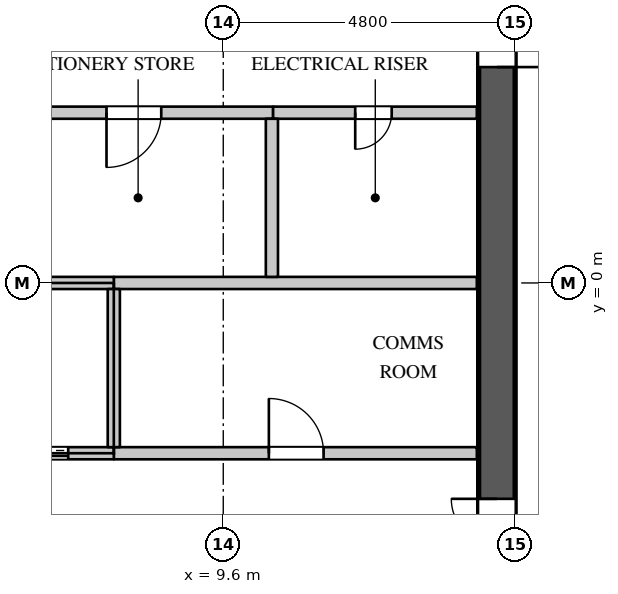
"""IFC4 building model, lengths in metres.
Left out: names, types, materials, properties, quantities, classifications, styles, units other than length and angle.
Written with IfcOpenShell. Run it as: python <this file> out.ifc"""

import sys

from ifc_helpers import new_model, si_unit, direction, frame, frame_2d, origin, place, context, subcontext, project, spatial, rectangle, extrude, element, fill, save


model = new_model("IFC4")
c1 = context("Model", 3, precision=1e-05, world=origin(), true_north=direction((0.0, 1.0)))
c2 = subcontext(c1, "Body", "Model", "MODEL_VIEW")
j1 = project(units=[si_unit("LENGTHUNIT", "METRE"), si_unit("PLANEANGLEUNIT", "RADIAN")], contexts=[c1])
p1 = place(None, origin())
s1 = spatial("IfcSite", under=j1, at=p1, CompositionType="ELEMENT")
p2 = place(p1, origin())
s2 = spatial("IfcBuilding", under=s1, at=p2, CompositionType="ELEMENT")
p3 = place(p2, frame((0.0, 0.0, 293.7)))
s3 = spatial("IfcBuildingStorey", under=s2, at=p3, CompositionType="ELEMENT", Elevation=293.7)
p4 = place(p3, frame((14.1, -11.4, 0.0), z_axis=(0.0, 0.0, 1.0), x_axis=(0.0, 1.0, 0.0)))
e1 = element("IfcWall", 1, at=p4, inside=s3, PredefinedType="SHEAR", context=c2, shape_type="SweptSolid", body=[
    extrude(rectangle(XDim=22.8, YDim=0.6, at=frame_2d((11.4, 0.0))), origin(), (0.0, 0.0, 1.0), 4.2),
])
p5 = place(p4, frame((20.45, 0.0, 0.0)))
e2 = element("IfcOpeningElement", 2, at=p5, cuts=e1, PredefinedType="OPENING", context=c2, shape_type="SweptSolid", body=[
    extrude(rectangle(XDim=1.1, YDim=2.2, at=frame_2d((0.55, 1.1))), frame((0.0, 0.31, 0.0), z_axis=(0.0, -1.0, 0.0), x_axis=(1.0, 0.0, 0.0)), (0.0, 0.0, 1.0), 0.62),
])
p6 = place(p4, frame((1.25, 0.0, 0.0)))
e3 = element("IfcOpeningElement", 3, at=p6, cuts=e1, PredefinedType="OPENING", context=c2, shape_type="SweptSolid", body=[
    extrude(rectangle(XDim=1.1, YDim=2.2, at=frame_2d((0.55, 1.1))), frame((0.0, 0.31, 0.0), z_axis=(0.0, -1.0, 0.0), x_axis=(1.0, 0.0, 0.0)), (0.0, 0.0, 1.0), 0.62),
])
p7 = place(p4, frame((14.95, 0.0, 0.0)))
e4 = element("IfcOpeningElement", 4, at=p7, cuts=e1, PredefinedType="OPENING", context=c2, shape_type="SweptSolid", body=[
    extrude(rectangle(XDim=1.5, YDim=2.4, at=frame_2d((0.75, 1.2))), frame((0.0, 0.31, 0.0), z_axis=(0.0, -1.0, 0.0), x_axis=(1.0, 0.0, 0.0)), (0.0, 0.0, 1.0), 0.62),
])
p8 = place(p4, frame((6.35, 0.0, 0.0)))
e5 = element("IfcOpeningElement", 5, at=p8, cuts=e1, PredefinedType="OPENING", context=c2, shape_type="SweptSolid", body=[
    extrude(rectangle(XDim=1.5, YDim=2.4, at=frame_2d((0.75, 1.2))), frame((0.0, 0.31, 0.0), z_axis=(0.0, -1.0, 0.0), x_axis=(1.0, 0.0, 0.0)), (0.0, 0.0, 1.0), 0.62),
])
p9 = place(p3, frame((-7.82, 2.8, 0.0), z_axis=(0.0, 0.0, 1.0), x_axis=(1.0, 0.0, 0.0)))
e6 = element("IfcWall", 6, at=p9, inside=s3, PredefinedType="PARTITIONING", context=c2, shape_type="SweptSolid", body=[
    extrude(rectangle(XDim=18.24, YDim=0.2, at=frame_2d((9.12, 0.0))), origin(), (0.0, 0.0, 1.0), 3.95),
])
p10 = place(p9, frame((2.75, 0.0, 0.0)))
e7 = element("IfcOpeningElement", 7, at=p10, cuts=e6, PredefinedType="OPENING", context=c2, shape_type="SweptSolid", body=[
    extrude(rectangle(XDim=0.9, YDim=2.2, at=frame_2d((0.45, 1.1))), frame((0.0, 0.11, 0.0), z_axis=(0.0, -1.0, 0.0), x_axis=(1.0, 0.0, 0.0)), (0.0, 0.0, 1.0), 0.22),
])
p11 = place(p9, frame((9.55, 0.0, 0.0)))
e8 = element("IfcOpeningElement", 8, at=p11, cuts=e6, PredefinedType="OPENING", context=c2, shape_type="SweptSolid", body=[
    extrude(rectangle(XDim=0.9, YDim=2.2, at=frame_2d((0.45, 1.1))), frame((0.0, 0.11, 0.0), z_axis=(0.0, -1.0, 0.0), x_axis=(1.0, 0.0, 0.0)), (0.0, 0.0, 1.0), 0.22),
])
p12 = place(p9, frame((15.5, 0.0, 0.0)))
e9 = element("IfcOpeningElement", 9, at=p12, cuts=e6, PredefinedType="OPENING", context=c2, shape_type="SweptSolid", body=[
    extrude(rectangle(XDim=0.9, YDim=2.2, at=frame_2d((0.45, 1.1))), frame((0.0, 0.11, 0.0), z_axis=(0.0, -1.0, 0.0), x_axis=(1.0, 0.0, 0.0)), (0.0, 0.0, 1.0), 0.22),
])
p13 = place(p3, frame((7.8, -2.8, 0.0), z_axis=(0.0, 0.0, 1.0), x_axis=(1.0, 0.0, 0.0)))
e10 = element("IfcWall", 10, at=p13, inside=s3, PredefinedType="PARTITIONING", context=c2, shape_type="SweptSolid", body=[
    extrude(rectangle(XDim=5.97, YDim=0.2, at=frame_2d((2.985, 0.0))), origin(), (0.0, 0.0, 1.0), 3.95),
])
p14 = place(p13, frame((2.55, 0.0, 0.0)))
e11 = element("IfcOpeningElement", 11, at=p14, cuts=e10, PredefinedType="OPENING", context=c2, shape_type="SweptSolid", body=[
    extrude(rectangle(XDim=0.9, YDim=2.2, at=frame_2d((0.45, 1.1))), frame((0.0, 0.11, 0.0), z_axis=(0.0, -1.0, 0.0), x_axis=(1.0, 0.0, 0.0)), (0.0, 0.0, 1.0), 0.22),
])
p15 = place(p3, frame((7.8, 0.0, 0.0), z_axis=(0.0, 0.0, 1.0), x_axis=(1.0, 0.0, 0.0)))
e12 = element("IfcWall", 12, at=p15, inside=s3, PredefinedType="PARTITIONING", context=c2, shape_type="SweptSolid", body=[
    extrude(rectangle(XDim=5.97, YDim=0.2, at=frame_2d((2.985, 0.0))), origin(), (0.0, 0.0, 1.0), 3.95),
])
p16 = place(p3, frame((10.42, 2.8, 0.0), z_axis=(0.0, 0.0, 1.0), x_axis=(1.0, 0.0, 0.0)))
e13 = element("IfcWall", 13, at=p16, inside=s3, PredefinedType="PARTITIONING", context=c2, shape_type="SweptSolid", body=[
    extrude(rectangle(XDim=3.35, YDim=0.2, at=frame_2d((1.675, 0.0))), origin(), (0.0, 0.0, 1.0), 3.95),
])
p17 = place(p16, frame((1.35, 0.0, 0.0)))
e14 = element("IfcOpeningElement", 14, at=p17, cuts=e13, PredefinedType="OPENING", context=c2, shape_type="SweptSolid", body=[
    extrude(rectangle(XDim=0.6, YDim=2.0, at=frame_2d((0.3, 1.0))), frame((0.0, 0.11, 0.0), z_axis=(0.0, -1.0, 0.0), x_axis=(1.0, 0.0, 0.0)), (0.0, 0.0, 1.0), 0.22),
])
p18 = place(p3, frame((10.4, 0.1, 0.0), z_axis=(0.0, 0.0, 1.0), x_axis=(0.0, 1.0, 0.0)))
e15 = element("IfcWall", 15, at=p18, inside=s3, PredefinedType="PARTITIONING", context=c2, shape_type="SweptSolid", body=[
    extrude(rectangle(XDim=2.6, YDim=0.2, at=frame_2d((1.3, 0.0))), origin(), (0.0, 0.0, 1.0), 3.95),
])
p19 = place(p3, frame((-13.77, 0.0, 0.0), z_axis=(0.0, 0.0, 1.0), x_axis=(1.0, 0.0, 0.0)))
e16 = element("IfcWall", 16, at=p19, inside=s3, PredefinedType="PARTITIONING", context=c2, shape_type="SweptSolid", body=[
    extrude(rectangle(XDim=21.57, YDim=0.2, at=frame_2d((10.785, 0.0))), origin(), (0.0, 0.0, 1.0), 3.95),
])
p20 = place(p3, frame((-10.4, -2.8, 0.0), z_axis=(0.0, 0.0, 1.0), x_axis=(1.0, 0.0, 0.0)))
e17 = element("IfcWall", 17, at=p20, inside=s3, PredefinedType="PARTITIONING", context=c2, shape_type="SweptSolid", body=[
    extrude(rectangle(XDim=18.2, YDim=0.2, at=frame_2d((9.1, 0.0))), origin(), (0.0, 0.0, 1.0), 3.95),
])
p21 = place(p20, frame((0.75, 0.0, 0.0)))
e18 = element("IfcOpeningElement", 18, at=p21, cuts=e17, PredefinedType="OPENING", context=c2, shape_type="SweptSolid", body=[
    extrude(rectangle(XDim=1.1, YDim=2.2, at=frame_2d((0.55, 1.1))), frame((0.0, 0.11, 0.0), z_axis=(0.0, -1.0, 0.0), x_axis=(1.0, 0.0, 0.0)), (0.0, 0.0, 1.0), 0.22),
])
p22 = place(p20, frame((3.35, 0.0, 0.0)))
e19 = element("IfcOpeningElement", 19, at=p22, cuts=e17, PredefinedType="OPENING", context=c2, shape_type="SweptSolid", body=[
    extrude(rectangle(XDim=1.1, YDim=2.2, at=frame_2d((0.55, 1.1))), frame((0.0, 0.11, 0.0), z_axis=(0.0, -1.0, 0.0), x_axis=(1.0, 0.0, 0.0)), (0.0, 0.0, 1.0), 0.22),
])
p23 = place(p20, frame((5.95, 0.0, 0.0)))
e20 = element("IfcOpeningElement", 20, at=p23, cuts=e17, PredefinedType="OPENING", context=c2, shape_type="SweptSolid", body=[
    extrude(rectangle(XDim=1.1, YDim=2.2, at=frame_2d((0.55, 1.1))), frame((0.0, 0.11, 0.0), z_axis=(0.0, -1.0, 0.0), x_axis=(1.0, 0.0, 0.0)), (0.0, 0.0, 1.0), 0.22),
])
p24 = place(p20, frame((8.55, 0.0, 0.0)))
e21 = element("IfcOpeningElement", 21, at=p24, cuts=e17, PredefinedType="OPENING", context=c2, shape_type="SweptSolid", body=[
    extrude(rectangle(XDim=1.1, YDim=2.2, at=frame_2d((0.55, 1.1))), frame((0.0, 0.11, 0.0), z_axis=(0.0, -1.0, 0.0), x_axis=(1.0, 0.0, 0.0)), (0.0, 0.0, 1.0), 0.22),
])
p25 = place(p20, frame((11.15, 0.0, 0.0)))
e22 = element("IfcOpeningElement", 22, at=p25, cuts=e17, PredefinedType="OPENING", context=c2, shape_type="SweptSolid", body=[
    extrude(rectangle(XDim=1.1, YDim=2.2, at=frame_2d((0.55, 1.1))), frame((0.0, 0.11, 0.0), z_axis=(0.0, -1.0, 0.0), x_axis=(1.0, 0.0, 0.0)), (0.0, 0.0, 1.0), 0.22),
])
p26 = place(p20, frame((13.75, 0.0, 0.0)))
e23 = element("IfcOpeningElement", 23, at=p26, cuts=e17, PredefinedType="OPENING", context=c2, shape_type="SweptSolid", body=[
    extrude(rectangle(XDim=1.1, YDim=2.2, at=frame_2d((0.55, 1.1))), frame((0.0, 0.11, 0.0), z_axis=(0.0, -1.0, 0.0), x_axis=(1.0, 0.0, 0.0)), (0.0, 0.0, 1.0), 0.22),
])
p27 = place(p20, frame((16.35, 0.0, 0.0)))
e24 = element("IfcOpeningElement", 24, at=p27, cuts=e17, PredefinedType="OPENING", context=c2, shape_type="SweptSolid", body=[
    extrude(rectangle(XDim=1.1, YDim=2.2, at=frame_2d((0.55, 1.1))), frame((0.0, 0.11, 0.0), z_axis=(0.0, -1.0, 0.0), x_axis=(1.0, 0.0, 0.0)), (0.0, 0.0, 1.0), 0.22),
])
p28 = place(p3, frame((7.8, -2.7, 0.0), z_axis=(0.0, 0.0, 1.0), x_axis=(0.0, 1.0, 0.0)))
e25 = element("IfcWall", 25, at=p28, inside=s3, PredefinedType="PARTITIONING", context=c2, shape_type="SweptSolid", body=[
    extrude(rectangle(XDim=2.6, YDim=0.2, at=frame_2d((1.3, 0.0))), origin(), (0.0, 0.0, 1.0), 3.95),
])
p29 = place(p17, origin())
e26 = element("IfcDoor", 26, at=p29, inside=s3, OperationType="SINGLE_SWING_RIGHT", PredefinedType="DOOR", context=c2, shape_type="SweptSolid", body=[
    extrude(rectangle(XDim=0.6, YDim=2.0, at=frame_2d((0.3, 1.0))), frame((0.0, 0.025, 0.0), z_axis=(0.0, -1.0, 0.0), x_axis=(1.0, 0.0, 0.0)), (0.0, 0.0, 1.0), 0.05),
])
fill(e14, e26)
p30 = place(p14, origin())
e27 = element("IfcDoor", 27, at=p30, inside=s3, OperationType="SINGLE_SWING_LEFT", PredefinedType="DOOR", context=c2, shape_type="SweptSolid", body=[
    extrude(rectangle(XDim=0.9, YDim=2.2, at=frame_2d((0.45, 1.1))), frame((0.0, 0.025, 0.0), z_axis=(0.0, -1.0, 0.0), x_axis=(1.0, 0.0, 0.0)), (0.0, 0.0, 1.0), 0.05),
])
fill(e11, e27)
p31 = place(p12, origin())
e28 = element("IfcDoor", 28, at=p31, inside=s3, OperationType="SINGLE_SWING_RIGHT", PredefinedType="DOOR", context=c2, shape_type="SweptSolid", body=[
    extrude(rectangle(XDim=0.9, YDim=2.2, at=frame_2d((0.45, 1.1))), frame((0.0, 0.025, 0.0), z_axis=(0.0, -1.0, 0.0), x_axis=(1.0, 0.0, 0.0)), (0.0, 0.0, 1.0), 0.05),
])
fill(e9, e28)
p32 = place(p27, origin())
e29 = element("IfcDoor", 29, at=p32, inside=s3, OperationType="DOUBLE_DOOR_SLIDING", PredefinedType="DOOR", context=c2, shape_type="SweptSolid", body=[
    extrude(rectangle(XDim=1.1, YDim=2.2, at=frame_2d((0.55, 1.1))), frame((0.0, 0.025, 0.0), z_axis=(0.0, -1.0, 0.0), x_axis=(1.0, 0.0, 0.0)), (0.0, 0.0, 1.0), 0.05),
])
fill(e24, e29)
p33 = place(p7, origin())
e30 = element("IfcDoor", 30, at=p33, inside=s3, OperationType="DOUBLE_DOOR_SINGLE_SWING", PredefinedType="DOOR", context=c2, shape_type="SweptSolid", body=[
    extrude(rectangle(XDim=1.5, YDim=2.4, at=frame_2d((0.75, 1.2))), frame((0.0, -0.245, 0.0), z_axis=(0.0, -1.0, 0.0), x_axis=(1.0, 0.0, 0.0)), (0.0, 0.0, 1.0), 0.05),
])
fill(e4, e30)
p34 = place(p8, origin())
e31 = element("IfcDoor", 31, at=p34, inside=s3, OperationType="DOUBLE_DOOR_SINGLE_SWING", PredefinedType="DOOR", context=c2, shape_type="SweptSolid", body=[
    extrude(rectangle(XDim=1.5, YDim=2.4, at=frame_2d((0.75, 1.2))), frame((0.0, 0.295, 0.0), z_axis=(0.0, -1.0, 0.0), x_axis=(1.0, 0.0, 0.0)), (0.0, 0.0, 1.0), 0.05),
])
fill(e5, e31)
save(model, sys.argv[1])
